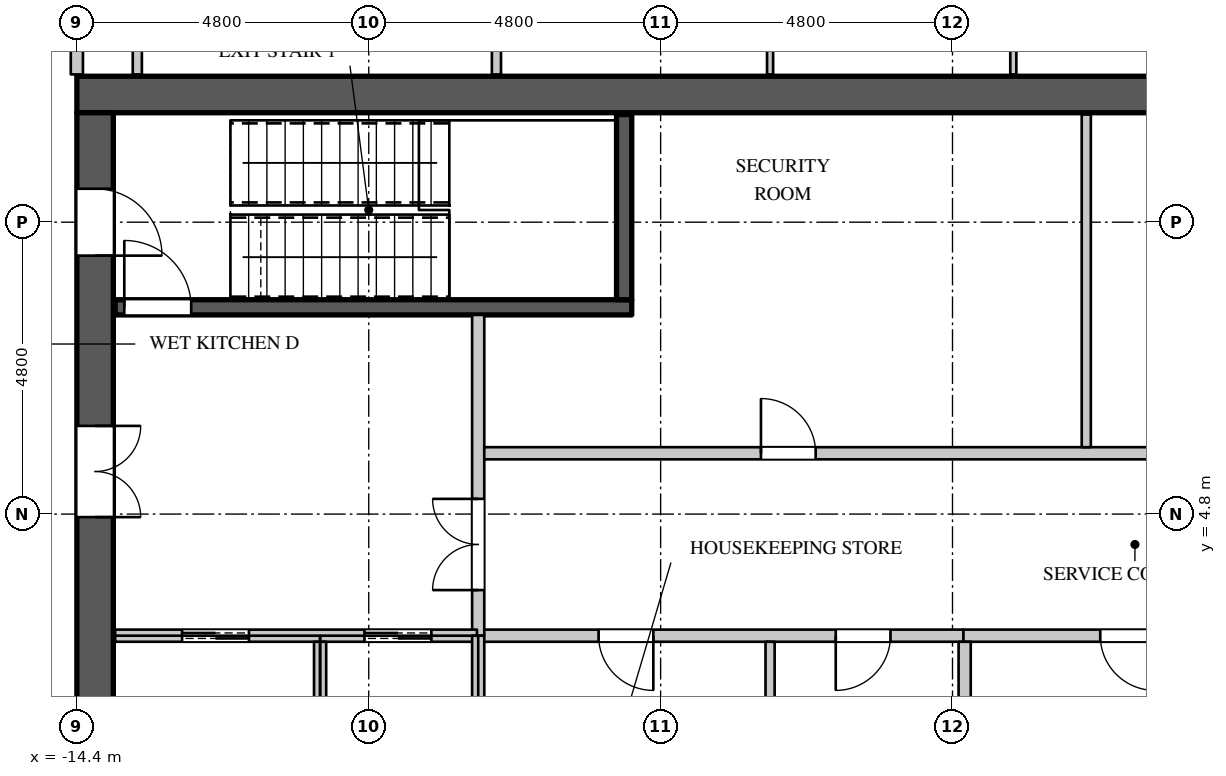
"""IFC4 building model, lengths in metres.
Left out: names, types, materials, properties, quantities, classifications, styles, units other than length and angle.
Written with IfcOpenShell. Run it as: python <this file> out.ifc"""

import sys

from ifc_helpers import new_model, si_unit, direction, frame, frame_2d, origin, place, context, subcontext, project, spatial, rectangle, extrude, element, fill, save


model = new_model("IFC4")
c1 = context("Model", 3, precision=1e-05, world=origin(), true_north=direction((0.0, 1.0)))
c2 = subcontext(c1, "Body", "Model", "MODEL_VIEW")
j1 = project(units=[si_unit("LENGTHUNIT", "METRE"), si_unit("PLANEANGLEUNIT", "RADIAN")], contexts=[c1])
p1 = place(None, origin())
s1 = spatial("IfcSite", under=j1, at=p1, CompositionType="ELEMENT")
p2 = place(p1, origin())
s2 = spatial("IfcBuilding", under=s1, at=p2, CompositionType="ELEMENT")
p3 = place(p2, frame((0.0, 0.0, 260.1)))
s3 = spatial("IfcBuildingStorey", under=s2, at=p3, CompositionType="ELEMENT", Elevation=260.1)
p4 = place(p3, frame((-14.4, 11.7, 0.0), z_axis=(0.0, 0.0, 1.0), x_axis=(1.0, 0.0, 0.0)))
e1 = element("IfcWall", 1, at=p4, inside=s3, PredefinedType="SHEAR", context=c2, shape_type="SweptSolid", body=[
    extrude(rectangle(XDim=28.8, YDim=0.6, at=frame_2d((14.4, 0.0))), origin(), (0.0, 0.0, 1.0), 4.2),
])
p5 = place(p3, frame((-14.1, -11.4, 0.0), z_axis=(0.0, 0.0, 1.0), x_axis=(0.0, 1.0, 0.0)))
e2 = element("IfcWall", 2, at=p5, inside=s3, PredefinedType="SHEAR", context=c2, shape_type="SweptSolid", body=[
    extrude(rectangle(XDim=22.8, YDim=0.6, at=frame_2d((11.4, 0.0))), origin(), (0.0, 0.0, 1.0), 4.2),
])
p6 = place(p5, frame((20.45, 0.0, 0.0)))
e3 = element("IfcOpeningElement", 3, at=p6, cuts=e2, PredefinedType="OPENING", context=c2, shape_type="SweptSolid", body=[
    extrude(rectangle(XDim=1.1, YDim=2.2, at=frame_2d((0.55, 1.1))), frame((0.0, 0.31, 0.0), z_axis=(0.0, -1.0, 0.0), x_axis=(1.0, 0.0, 0.0)), (0.0, 0.0, 1.0), 0.62),
])
p7 = place(p5, frame((1.25, 0.0, 0.0)))
e4 = element("IfcOpeningElement", 4, at=p7, cuts=e2, PredefinedType="OPENING", context=c2, shape_type="SweptSolid", body=[
    extrude(rectangle(XDim=1.1, YDim=2.2, at=frame_2d((0.55, 1.1))), frame((0.0, 0.31, 0.0), z_axis=(0.0, -1.0, 0.0), x_axis=(1.0, 0.0, 0.0)), (0.0, 0.0, 1.0), 0.62),
])
p8 = place(p5, frame((16.15, 0.0, 0.0)))
e5 = element("IfcOpeningElement", 5, at=p8, cuts=e2, PredefinedType="OPENING", context=c2, shape_type="SweptSolid", body=[
    extrude(rectangle(XDim=1.5, YDim=2.4, at=frame_2d((0.75, 1.2))), frame((0.0, 0.31, 0.0), z_axis=(0.0, -1.0, 0.0), x_axis=(1.0, 0.0, 0.0)), (0.0, 0.0, 1.0), 0.62),
])
p9 = place(p5, frame((5.15, 0.0, 0.0)))
e6 = element("IfcOpeningElement", 6, at=p9, cuts=e2, PredefinedType="OPENING", context=c2, shape_type="SweptSolid", body=[
    extrude(rectangle(XDim=1.5, YDim=2.4, at=frame_2d((0.75, 1.2))), frame((0.0, 0.31, 0.0), z_axis=(0.0, -1.0, 0.0), x_axis=(1.0, 0.0, 0.0)), (0.0, 0.0, 1.0), 0.62),
])
p10 = place(p3, frame((-14.4, 12.03, 0.0), z_axis=(0.0, 0.0, 1.0), x_axis=(0.0, 1.0, 0.0)))
e7 = element("IfcWall", 7, at=p10, inside=s3, PredefinedType="PARTITIONING", context=c2, shape_type="SweptSolid", body=[
    extrude(rectangle(XDim=2.27, YDim=0.2, at=frame_2d((1.135, 0.0))), origin(), (0.0, 0.0, 1.0), 3.95),
])
p11 = place(p3, frame((-7.82, 2.8, 0.0), z_axis=(0.0, 0.0, 1.0), x_axis=(1.0, 0.0, 0.0)))
e8 = element("IfcWall", 8, at=p11, inside=s3, PredefinedType="PARTITIONING", context=c2, shape_type="SweptSolid", body=[
    extrude(rectangle(XDim=8.0, YDim=0.2, at=frame_2d((4.0, 0.0))), origin(), (0.0, 0.0, 1.0), 3.95),
])
p12 = place(p11, frame((2.0, 0.0, 0.0)))
e9 = element("IfcOpeningElement", 9, at=p12, cuts=e8, PredefinedType="OPENING", context=c2, shape_type="SweptSolid", body=[
    extrude(rectangle(XDim=0.9, YDim=2.2, at=frame_2d((0.45, 1.1))), frame((0.0, 0.11, 0.0), z_axis=(0.0, -1.0, 0.0), x_axis=(1.0, 0.0, 0.0)), (0.0, 0.0, 1.0), 0.22),
])
p13 = place(p11, frame((5.9, 0.0, 0.0)))
e10 = element("IfcOpeningElement", 10, at=p13, cuts=e8, PredefinedType="OPENING", context=c2, shape_type="SweptSolid", body=[
    extrude(rectangle(XDim=0.9, YDim=2.2, at=frame_2d((0.45, 1.1))), frame((0.0, 0.11, 0.0), z_axis=(0.0, -1.0, 0.0), x_axis=(1.0, 0.0, 0.0)), (0.0, 0.0, 1.0), 0.22),
])
p14 = place(p3, frame((-7.8, 2.8, 0.0), z_axis=(0.0, 0.0, 1.0), x_axis=(0.0, 1.0, 0.0)))
e11 = element("IfcWall", 11, at=p14, inside=s3, PredefinedType="PARTITIONING", context=c2, shape_type="SweptSolid", body=[
    extrude(rectangle(XDim=5.275, YDim=0.2, at=frame_2d((2.637, 0.0))), origin(), (0.0, 0.0, 1.0), 3.95),
])
p15 = place(p14, frame((0.75, 0.0, 0.0)))
e12 = element("IfcOpeningElement", 12, at=p15, cuts=e11, PredefinedType="OPENING", context=c2, shape_type="SweptSolid", body=[
    extrude(rectangle(XDim=1.5, YDim=2.4, at=frame_2d((0.75, 1.2))), frame((0.0, 0.11, 0.0), z_axis=(0.0, -1.0, 0.0), x_axis=(1.0, 0.0, 0.0)), (0.0, 0.0, 1.0), 0.22),
])
p16 = place(p3, frame((-7.7, 5.8, 0.0), z_axis=(0.0, 0.0, 1.0), x_axis=(1.0, 0.0, 0.0)))
e13 = element("IfcWall", 13, at=p16, inside=s3, PredefinedType="PARTITIONING", context=c2, shape_type="SweptSolid", body=[
    extrude(rectangle(XDim=21.47, YDim=0.2, at=frame_2d((10.735, 0.0))), origin(), (0.0, 0.0, 1.0), 3.95),
])
p17 = place(p16, frame((4.55, 0.0, 0.0)))
e14 = element("IfcOpeningElement", 14, at=p17, cuts=e13, PredefinedType="OPENING", context=c2, shape_type="SweptSolid", body=[
    extrude(rectangle(XDim=0.9, YDim=2.2, at=frame_2d((0.45, 1.1))), frame((0.0, 0.11, 0.0), z_axis=(0.0, -1.0, 0.0), x_axis=(1.0, 0.0, 0.0)), (0.0, 0.0, 1.0), 0.22),
])
p18 = place(p16, frame((15.15, 0.0, 0.0)))
e15 = element("IfcOpeningElement", 15, at=p18, cuts=e13, PredefinedType="OPENING", context=c2, shape_type="SweptSolid", body=[
    extrude(rectangle(XDim=0.9, YDim=2.2, at=frame_2d((0.45, 1.1))), frame((0.0, 0.11, 0.0), z_axis=(0.0, -1.0, 0.0), x_axis=(1.0, 0.0, 0.0)), (0.0, 0.0, 1.0), 0.22),
])
p19 = place(p3, frame((-13.406, 12.03, 0.0), z_axis=(0.0, 0.0, 1.0), x_axis=(0.0, 1.0, 0.0)))
e16 = element("IfcWall", 16, at=p19, inside=s3, PredefinedType="PARTITIONING", context=c2, shape_type="SweptSolid", body=[
    extrude(rectangle(XDim=13.701, YDim=0.15, at=frame_2d((6.851, 0.0))), origin(), (0.0, 0.0, 1.0), 3.3),
])
p20 = place(p19, frame((2.5, 0.0, 0.0)))
e17 = element("IfcOpeningElement", 17, at=p20, cuts=e16, PredefinedType="OPENING", context=c2, shape_type="SweptSolid", body=[
    extrude(rectangle(XDim=1.5, YDim=2.2, at=frame_2d((0.75, 1.1))), frame((0.0, 0.085, 0.0), z_axis=(0.0, -1.0, 0.0), x_axis=(1.0, 0.0, 0.0)), (0.0, 0.0, 1.0), 0.17),
])
p21 = place(p3, frame((-7.5, 12.03, 0.0), z_axis=(0.0, 0.0, 1.0), x_axis=(0.0, 1.0, 0.0)))
e18 = element("IfcWall", 18, at=p21, inside=s3, PredefinedType="PARTITIONING", context=c2, shape_type="SweptSolid", body=[
    extrude(rectangle(XDim=6.445, YDim=0.15, at=frame_2d((3.223, 0.0))), origin(), (0.0, 0.0, 1.0), 3.95),
])
p22 = place(p21, frame((2.75, 0.0, 0.0)))
e19 = element("IfcOpeningElement", 19, at=p22, cuts=e18, PredefinedType="OPENING", context=c2, shape_type="SweptSolid", body=[
    extrude(rectangle(XDim=0.9, YDim=2.2, at=frame_2d((0.45, 1.1))), frame((0.0, 0.085, 0.0), z_axis=(0.0, -1.0, 0.0), x_axis=(1.0, 0.0, 0.0)), (0.0, 0.0, 1.0), 0.17),
])
p23 = place(p3, frame((-3.0, 0.1, 0.0), z_axis=(0.0, 0.0, 1.0), x_axis=(0.0, 1.0, 0.0)))
e20 = element("IfcWall", 20, at=p23, inside=s3, PredefinedType="PARTITIONING", context=c2, shape_type="SweptSolid", body=[
    extrude(rectangle(XDim=2.6, YDim=0.15, at=frame_2d((1.3, 0.0))), origin(), (0.0, 0.0, 1.0), 3.95),
])
p24 = place(p3, frame((2.2, 5.9, 0.0), z_axis=(0.0, 0.0, 1.0), x_axis=(0.0, 1.0, 0.0)))
e21 = element("IfcWall", 21, at=p24, inside=s3, PredefinedType="PARTITIONING", context=c2, shape_type="SweptSolid", body=[
    extrude(rectangle(XDim=5.47, YDim=0.15, at=frame_2d((2.735, 0.0))), origin(), (0.0, 0.0, 1.0), 3.95),
])
p25 = place(p3, frame((0.18, 2.8, 0.0), z_axis=(0.0, 0.0, 1.0), x_axis=(1.0, 0.0, 0.0)))
e22 = element("IfcWall", 22, at=p25, inside=s3, PredefinedType="PARTITIONING", context=c2, shape_type="SweptSolid", body=[
    extrude(rectangle(XDim=13.59, YDim=0.2, at=frame_2d((6.795, 0.0))), origin(), (0.0, 0.0, 1.0), 3.95),
])
p26 = place(p25, frame((11.55, 0.0, 0.0)))
e23 = element("IfcOpeningElement", 23, at=p26, cuts=e22, PredefinedType="OPENING", context=c2, shape_type="SweptSolid", body=[
    extrude(rectangle(XDim=0.6, YDim=2.0, at=frame_2d((0.3, 1.0))), frame((0.0, 0.11, 0.0), z_axis=(0.0, -1.0, 0.0), x_axis=(1.0, 0.0, 0.0)), (0.0, 0.0, 1.0), 0.22),
])
p27 = place(p25, frame((2.25, 0.0, 0.0)))
e24 = element("IfcOpeningElement", 24, at=p27, cuts=e22, PredefinedType="OPENING", context=c2, shape_type="SweptSolid", body=[
    extrude(rectangle(XDim=0.9, YDim=2.2, at=frame_2d((0.45, 1.1))), frame((0.0, 0.11, 0.0), z_axis=(0.0, -1.0, 0.0), x_axis=(1.0, 0.0, 0.0)), (0.0, 0.0, 1.0), 0.22),
])
p28 = place(p25, frame((7.25, 0.0, 0.0)))
e25 = element("IfcOpeningElement", 25, at=p28, cuts=e22, PredefinedType="OPENING", context=c2, shape_type="SweptSolid", body=[
    extrude(rectangle(XDim=0.9, YDim=2.2, at=frame_2d((0.45, 1.1))), frame((0.0, 0.11, 0.0), z_axis=(0.0, -1.0, 0.0), x_axis=(1.0, 0.0, 0.0)), (0.0, 0.0, 1.0), 0.22),
])
p29 = place(p3, frame((0.2, 0.1, 0.0), z_axis=(0.0, 0.0, 1.0), x_axis=(0.0, 1.0, 0.0)))
e26 = element("IfcWall", 26, at=p29, inside=s3, PredefinedType="PARTITIONING", context=c2, shape_type="SweptSolid", body=[
    extrude(rectangle(XDim=2.6, YDim=0.2, at=frame_2d((1.3, 0.0))), origin(), (0.0, 0.0, 1.0), 3.95),
])
p30 = place(p3, frame((-13.77, 2.8, 0.0), z_axis=(0.0, 0.0, 1.0), x_axis=(1.0, 0.0, 0.0)))
e27 = element("IfcWall", 27, at=p30, inside=s3, PredefinedType="PARTITIONING", context=c2, shape_type="SweptSolid", body=[
    extrude(rectangle(XDim=5.95, YDim=0.2, at=frame_2d((2.975, 0.0))), origin(), (0.0, 0.0, 1.0), 3.95),
])
p31 = place(p30, frame((1.1, 0.0, 0.0)))
e28 = element("IfcOpeningElement", 28, at=p31, cuts=e27, PredefinedType="OPENING", context=c2, shape_type="SweptSolid", body=[
    extrude(rectangle(XDim=1.1, YDim=2.2, at=frame_2d((0.55, 1.1))), frame((0.0, 0.11, 0.0), z_axis=(0.0, -1.0, 0.0), x_axis=(1.0, 0.0, 0.0)), (0.0, 0.0, 1.0), 0.22),
])
p32 = place(p30, frame((4.1, 0.0, 0.0)))
e29 = element("IfcOpeningElement", 29, at=p32, cuts=e27, PredefinedType="OPENING", context=c2, shape_type="SweptSolid", body=[
    extrude(rectangle(XDim=1.1, YDim=2.2, at=frame_2d((0.55, 1.1))), frame((0.0, 0.11, 0.0), z_axis=(0.0, -1.0, 0.0), x_axis=(1.0, 0.0, 0.0)), (0.0, 0.0, 1.0), 0.22),
])
p33 = place(p3, frame((-10.4, 0.0, 0.0), z_axis=(0.0, 0.0, 1.0), x_axis=(0.0, 1.0, 0.0)))
e30 = element("IfcWall", 30, at=p33, inside=s3, PredefinedType="PARTITIONING", context=c2, shape_type="SweptSolid", body=[
    extrude(rectangle(XDim=2.7, YDim=0.2, at=frame_2d((1.35, 0.0))), origin(), (0.0, 0.0, 1.0), 3.95),
])
p34 = place(p3, frame((-7.8, 0.0, 0.0), z_axis=(0.0, 0.0, 1.0), x_axis=(0.0, 1.0, 0.0)))
e31 = element("IfcWall", 31, at=p34, inside=s3, PredefinedType="PARTITIONING", context=c2, shape_type="SweptSolid", body=[
    extrude(rectangle(XDim=2.8, YDim=0.2, at=frame_2d((1.4, 0.0))), origin(), (0.0, 0.0, 1.0), 3.95),
])
p35 = place(p3, frame((-13.77, 8.2, 0.0), z_axis=(0.0, 0.0, 1.0), x_axis=(1.0, 0.0, 0.0)))
e32 = element("IfcWall", 32, at=p35, inside=s3, PredefinedType="SHEAR", context=c2, shape_type="SweptSolid", body=[
    extrude(rectangle(XDim=8.495, YDim=0.25, at=frame_2d((4.248, 0.0))), origin(), (0.0, 0.0, 1.0), 3.95),
])
p36 = place(p35, frame((0.15, 0.0, 0.0)))
e33 = element("IfcOpeningElement", 33, at=p36, cuts=e32, PredefinedType="OPENING", context=c2, shape_type="SweptSolid", body=[
    extrude(rectangle(XDim=1.1, YDim=2.2, at=frame_2d((0.55, 1.1))), frame((0.0, 0.135, 0.0), z_axis=(0.0, -1.0, 0.0), x_axis=(1.0, 0.0, 0.0)), (0.0, 0.0, 1.0), 0.27),
])
p37 = place(p3, frame((-5.4, 8.325, 0.0), z_axis=(0.0, 0.0, 1.0), x_axis=(0.0, 1.0, 0.0)))
e34 = element("IfcWall", 34, at=p37, inside=s3, PredefinedType="SHEAR", context=c2, shape_type="SweptSolid", body=[
    extrude(rectangle(XDim=3.045, YDim=0.25, at=frame_2d((1.522, 0.0))), origin(), (0.0, 0.0, 1.0), 3.95),
])
p38 = place(p3, frame((-3.0, 12.03, 0.0), z_axis=(0.0, 0.0, 1.0), x_axis=(0.0, 1.0, 0.0)))
e35 = element("IfcWall", 35, at=p38, inside=s3, PredefinedType="PARTITIONING", context=c2, shape_type="SweptSolid", body=[
    extrude(rectangle(XDim=7.395, YDim=0.1, at=frame_2d((3.698, 0.0))), origin(), (0.0, 0.0, 1.0), 3.95),
])
p39 = place(p3, frame((1.0, 12.03, 0.0), z_axis=(0.0, 0.0, 1.0), x_axis=(0.0, 1.0, 0.0)))
e36 = element("IfcWall", 36, at=p39, inside=s3, PredefinedType="PARTITIONING", context=c2, shape_type="SweptSolid", body=[
    extrude(rectangle(XDim=7.42, YDim=0.1, at=frame_2d((3.71, 0.0))), origin(), (0.0, 0.0, 1.0), 3.95),
])
p40 = place(p17, origin())
e37 = element("IfcDoor", 37, at=p40, inside=s3, OperationType="SINGLE_SWING_LEFT", PredefinedType="DOOR", context=c2, shape_type="SweptSolid", body=[
    extrude(rectangle(XDim=0.9, YDim=2.2, at=frame_2d((0.45, 1.1))), frame((0.0, 0.025, 0.0), z_axis=(0.0, -1.0, 0.0), x_axis=(1.0, 0.0, 0.0)), (0.0, 0.0, 1.0), 0.05),
])
fill(e14, e37)
p41 = place(p12, origin())
e38 = element("IfcDoor", 38, at=p41, inside=s3, OperationType="SINGLE_SWING_LEFT", PredefinedType="DOOR", context=c2, shape_type="SweptSolid", body=[
    extrude(rectangle(XDim=0.9, YDim=2.2, at=frame_2d((0.45, 1.1))), frame((0.0, 0.025, 0.0), z_axis=(0.0, -1.0, 0.0), x_axis=(1.0, 0.0, 0.0)), (0.0, 0.0, 1.0), 0.05),
])
fill(e9, e38)
p42 = place(p13, origin())
e39 = element("IfcDoor", 39, at=p42, inside=s3, OperationType="SINGLE_SWING_RIGHT", PredefinedType="DOOR", context=c2, shape_type="SweptSolid", body=[
    extrude(rectangle(XDim=0.9, YDim=2.2, at=frame_2d((0.45, 1.1))), frame((0.0, 0.025, 0.0), z_axis=(0.0, -1.0, 0.0), x_axis=(1.0, 0.0, 0.0)), (0.0, 0.0, 1.0), 0.05),
])
fill(e10, e39)
p43 = place(p27, origin())
e40 = element("IfcDoor", 40, at=p43, inside=s3, OperationType="SINGLE_SWING_LEFT", PredefinedType="DOOR", context=c2, shape_type="SweptSolid", body=[
    extrude(rectangle(XDim=0.9, YDim=2.2, at=frame_2d((0.45, 1.1))), frame((0.0, 0.025, 0.0), z_axis=(0.0, -1.0, 0.0), x_axis=(1.0, 0.0, 0.0)), (0.0, 0.0, 1.0), 0.05),
])
fill(e24, e40)
p44 = place(p31, origin())
e41 = element("IfcDoor", 41, at=p44, inside=s3, OperationType="DOUBLE_DOOR_SLIDING", PredefinedType="DOOR", context=c2, shape_type="SweptSolid", body=[
    extrude(rectangle(XDim=1.1, YDim=2.2, at=frame_2d((0.55, 1.1))), frame((0.0, 0.025, 0.0), z_axis=(0.0, -1.0, 0.0), x_axis=(1.0, 0.0, 0.0)), (0.0, 0.0, 1.0), 0.05),
])
fill(e28, e41)
p45 = place(p32, origin())
e42 = element("IfcDoor", 42, at=p45, inside=s3, OperationType="DOUBLE_DOOR_SLIDING", PredefinedType="DOOR", context=c2, shape_type="SweptSolid", body=[
    extrude(rectangle(XDim=1.1, YDim=2.2, at=frame_2d((0.55, 1.1))), frame((0.0, 0.025, 0.0), z_axis=(0.0, -1.0, 0.0), x_axis=(1.0, 0.0, 0.0)), (0.0, 0.0, 1.0), 0.05),
])
fill(e29, e42)
p46 = place(p36, origin())
e43 = element("IfcDoor", 43, at=p46, inside=s3, OperationType="SINGLE_SWING_LEFT", PredefinedType="DOOR", context=c2, shape_type="SweptSolid", body=[
    extrude(rectangle(XDim=1.1, YDim=2.2, at=frame_2d((0.55, 1.1))), frame((0.0, 0.025, 0.0), z_axis=(0.0, -1.0, 0.0), x_axis=(1.0, 0.0, 0.0)), (0.0, 0.0, 1.0), 0.05),
])
fill(e33, e43)
p47 = place(p15, origin())
e44 = element("IfcDoor", 44, at=p47, inside=s3, OperationType="DOUBLE_DOOR_SINGLE_SWING", PredefinedType="DOOR", context=c2, shape_type="SweptSolid", body=[
    extrude(rectangle(XDim=1.5, YDim=2.4, at=frame_2d((0.75, 1.2))), frame((0.0, 0.025, 0.0), z_axis=(0.0, -1.0, 0.0), x_axis=(1.0, 0.0, 0.0)), (0.0, 0.0, 1.0), 0.05),
])
fill(e12, e44)
p48 = place(p6, origin())
e45 = element("IfcDoor", 45, at=p48, inside=s3, OperationType="SINGLE_SWING_RIGHT", PredefinedType="DOOR", context=c2, shape_type="SweptSolid", body=[
    extrude(rectangle(XDim=1.1, YDim=2.2, at=frame_2d((0.55, 1.1))), frame((0.0, -0.245, 0.0), z_axis=(0.0, -1.0, 0.0), x_axis=(1.0, 0.0, 0.0)), (0.0, 0.0, 1.0), 0.05),
])
fill(e3, e45)
p49 = place(p8, origin())
e46 = element("IfcDoor", 46, at=p49, inside=s3, OperationType="DOUBLE_DOOR_SINGLE_SWING", PredefinedType="DOOR", context=c2, shape_type="SweptSolid", body=[
    extrude(rectangle(XDim=1.5, YDim=2.4, at=frame_2d((0.75, 1.2))), frame((0.0, -0.245, 0.0), z_axis=(0.0, -1.0, 0.0), x_axis=(1.0, 0.0, 0.0)), (0.0, 0.0, 1.0), 0.05),
])
fill(e5, e46)
save(model, sys.argv[1])
